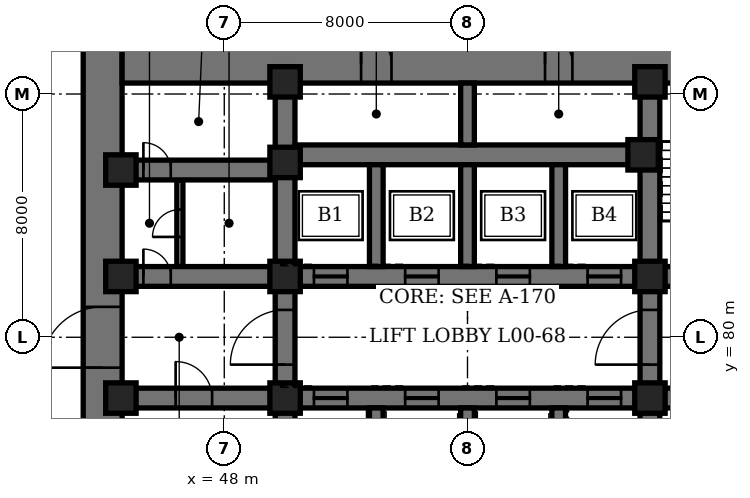
"""IFC4 building model, lengths in metres.
Left out: names, types, materials, properties, quantities, classifications, styles, units other than length and angle.
Written with IfcOpenShell. Run it as: python <this file> out.ifc"""

import sys

from ifc_helpers import new_model, si_unit, direction, frame, frame_2d, origin, origin_2d, place, context, subcontext, project, spatial, rectangle, hollow_rectangle, extrude, element, fill, save


model = new_model("IFC4")
c1 = context("Model", 3, precision=1e-05, world=origin(), true_north=direction((0.0, 1.0)))
c2 = subcontext(c1, "Body", "Model", "MODEL_VIEW")
j1 = project(units=[si_unit("LENGTHUNIT", "METRE"), si_unit("PLANEANGLEUNIT", "RADIAN")], contexts=[c1])
p1 = place(None, origin())
s1 = spatial("IfcSite", under=j1, at=p1, CompositionType="ELEMENT")
p2 = place(p1, origin())
s2 = spatial("IfcBuilding", under=s1, at=p2, CompositionType="ELEMENT")
p3 = place(p2, origin())
s3 = spatial("IfcBuildingStorey", under=s2, at=p3, CompositionType="ELEMENT", Elevation=0.0)
p4 = place(p3, frame((44.0, 70.2, -2.0), z_axis=(0.0, 0.0, 1.0), x_axis=(0.0, 1.0, 0.0)))
e1 = element("IfcWall", 1, at=p4, inside=s3, PredefinedType="SHEAR", context=c2, shape_type="SweptSolid", body=[
    extrude(rectangle(XDim=19.44, YDim=1.28, at=frame_2d((9.72, 0.0))), origin(), (0.0, 0.0, 1.0), 6.9),
])
p5 = place(p4, frame((8.8, 0.0, 2.0)))
e2 = element("IfcOpeningElement", 2, at=p5, cuts=e1, PredefinedType="OPENING", context=c2, shape_type="SweptSolid", body=[
    extrude(rectangle(XDim=2.0, YDim=2.4, at=frame_2d((1.0, 1.2))), frame((0.0, 0.65, 0.0), z_axis=(0.0, -1.0, 0.0), x_axis=(1.0, 0.0, 0.0)), (0.0, 0.0, 1.0), 1.3),
])
p6 = place(p3, frame((44.64, 89.0, -2.0), z_axis=(0.0, 0.0, 1.0), x_axis=(1.0, 0.0, 0.0)))
e3 = element("IfcWall", 3, at=p6, inside=s3, PredefinedType="SHEAR", context=c2, shape_type="SweptSolid", body=[
    extrude(rectangle(XDim=22.61, YDim=1.28, at=frame_2d((11.305, 0.0))), origin(), (0.0, 0.0, 1.0), 6.9),
])
p7 = place(p6, frame((7.86, 0.0, 2.0)))
e4 = element("IfcOpeningElement", 4, at=p7, cuts=e3, PredefinedType="OPENING", context=c2, shape_type="SweptSolid", body=[
    extrude(rectangle(XDim=1.0, YDim=2.1, at=frame_2d((0.5, 1.05))), frame((0.0, 0.65, 0.0), z_axis=(0.0, -1.0, 0.0), x_axis=(1.0, 0.0, 0.0)), (0.0, 0.0, 1.0), 1.3),
])
p8 = place(p6, frame((13.91, 0.0, 2.0)))
e5 = element("IfcOpeningElement", 5, at=p8, cuts=e3, PredefinedType="OPENING", context=c2, shape_type="SweptSolid", body=[
    extrude(rectangle(XDim=0.9, YDim=2.1, at=frame_2d((0.45, 1.05))), frame((0.0, 0.65, 0.0), z_axis=(0.0, -1.0, 0.0), x_axis=(1.0, 0.0, 0.0)), (0.0, 0.0, 1.0), 1.3),
])
p9 = place(p3, frame((50.0, 71.8, -2.0), z_axis=(0.0, 0.0, 1.0), x_axis=(0.0, 1.0, 0.0)))
e6 = element("IfcWall", 6, at=p9, inside=s3, PredefinedType="SHEAR", context=c2, shape_type="SweptSolid", body=[
    extrude(rectangle(XDim=16.56, YDim=0.65, at=frame_2d((8.28, 0.0))), origin(), (0.0, 0.0, 1.0), 6.9),
])
p10 = place(p9, frame((7.3, 0.0, 2.0)))
e7 = element("IfcOpeningElement", 7, at=p10, cuts=e6, PredefinedType="OPENING", context=c2, shape_type="SweptSolid", body=[
    extrude(rectangle(XDim=1.8, YDim=2.4, at=frame_2d((0.9, 1.2))), frame((0.0, 0.335, 0.0), z_axis=(0.0, -1.0, 0.0), x_axis=(1.0, 0.0, 0.0)), (0.0, 0.0, 1.0), 0.67),
])
p11 = place(p3, frame((62.0, 71.8, -2.0), z_axis=(0.0, 0.0, 1.0), x_axis=(0.0, 1.0, 0.0)))
e8 = element("IfcWall", 8, at=p11, inside=s3, PredefinedType="SHEAR", context=c2, shape_type="SweptSolid", body=[
    extrude(rectangle(XDim=16.56, YDim=0.65, at=frame_2d((8.28, 0.0))), origin(), (0.0, 0.0, 1.0), 6.9),
])
p12 = place(p11, frame((7.3, 0.0, 2.0)))
e9 = element("IfcOpeningElement", 9, at=p12, cuts=e8, PredefinedType="OPENING", context=c2, shape_type="SweptSolid", body=[
    extrude(rectangle(XDim=1.8, YDim=2.4, at=frame_2d((0.9, 1.2))), frame((0.0, 0.335, 0.0), z_axis=(0.0, -1.0, 0.0), x_axis=(1.0, 0.0, 0.0)), (0.0, 0.0, 1.0), 0.67),
])
p13 = place(p3, frame((44.64, 78.0, -2.0), z_axis=(0.0, 0.0, 1.0), x_axis=(1.0, 0.0, 0.0)))
e10 = element("IfcWall", 10, at=p13, inside=s3, PredefinedType="SHEAR", context=c2, shape_type="SweptSolid", body=[
    extrude(rectangle(XDim=5.035, YDim=0.65, at=frame_2d((2.518, 0.0))), origin(), (0.0, 0.0, 1.0), 6.9),
])
p14 = place(p13, frame((1.76, 0.0, 2.0)))
e11 = element("IfcOpeningElement", 11, at=p14, cuts=e10, PredefinedType="OPENING", context=c2, shape_type="SweptSolid", body=[
    extrude(rectangle(XDim=1.2, YDim=2.1, at=frame_2d((0.6, 1.05))), frame((0.0, 0.335, 0.0), z_axis=(0.0, -1.0, 0.0), x_axis=(1.0, 0.0, 0.0)), (0.0, 0.0, 1.0), 0.67),
])
p15 = place(p3, frame((44.64, 82.0, -2.0), z_axis=(0.0, 0.0, 1.0), x_axis=(1.0, 0.0, 0.0)))
e12 = element("IfcWall", 12, at=p15, inside=s3, PredefinedType="SHEAR", context=c2, shape_type="SweptSolid", body=[
    extrude(rectangle(XDim=5.035, YDim=0.65, at=frame_2d((2.518, 0.0))), origin(), (0.0, 0.0, 1.0), 6.9),
])
p16 = place(p15, frame((0.7, 0.0, 2.0)))
e13 = element("IfcOpeningElement", 13, at=p16, cuts=e12, PredefinedType="OPENING", context=c2, shape_type="SweptSolid", body=[
    extrude(rectangle(XDim=0.9, YDim=2.1, at=frame_2d((0.45, 1.05))), frame((0.0, 0.335, 0.0), z_axis=(0.0, -1.0, 0.0), x_axis=(1.0, 0.0, 0.0)), (0.0, 0.0, 1.0), 0.67),
])
p17 = place(p3, frame((44.64, 85.5, -2.0), z_axis=(0.0, 0.0, 1.0), x_axis=(1.0, 0.0, 0.0)))
e14 = element("IfcWall", 14, at=p17, inside=s3, PredefinedType="SHEAR", context=c2, shape_type="SweptSolid", body=[
    extrude(rectangle(XDim=5.035, YDim=0.65, at=frame_2d((2.518, 0.0))), origin(), (0.0, 0.0, 1.0), 6.9),
])
p18 = place(p17, frame((0.7, 0.0, 2.0)))
e15 = element("IfcOpeningElement", 15, at=p18, cuts=e14, PredefinedType="OPENING", context=c2, shape_type="SweptSolid", body=[
    extrude(rectangle(XDim=0.9, YDim=2.1, at=frame_2d((0.45, 1.05))), frame((0.0, 0.335, 0.0), z_axis=(0.0, -1.0, 0.0), x_axis=(1.0, 0.0, 0.0)), (0.0, 0.0, 1.0), 0.67),
])
p19 = place(p3, frame((62.325, 78.0, -2.0), z_axis=(0.0, 0.0, 1.0), x_axis=(1.0, 0.0, 0.0)))
e16 = element("IfcWall", 16, at=p19, inside=s3, PredefinedType="SHEAR", context=c2, shape_type="SweptSolid", body=[
    extrude(rectangle(XDim=4.925, YDim=0.65, at=frame_2d((2.462, 0.0))), origin(), (0.0, 0.0, 1.0), 6.9),
])
p20 = place(p19, frame((2.075, 0.0, 2.0)))
e17 = element("IfcOpeningElement", 17, at=p20, cuts=e16, PredefinedType="OPENING", context=c2, shape_type="SweptSolid", body=[
    extrude(rectangle(XDim=1.2, YDim=2.1, at=frame_2d((0.6, 1.05))), frame((0.0, 0.335, 0.0), z_axis=(0.0, -1.0, 0.0), x_axis=(1.0, 0.0, 0.0)), (0.0, 0.0, 1.0), 0.67),
])
p21 = place(p3, frame((62.325, 82.0, -2.0), z_axis=(0.0, 0.0, 1.0), x_axis=(1.0, 0.0, 0.0)))
e18 = element("IfcWall", 18, at=p21, inside=s3, PredefinedType="SHEAR", context=c2, shape_type="SweptSolid", body=[
    extrude(rectangle(XDim=4.925, YDim=0.65, at=frame_2d((2.462, 0.0))), origin(), (0.0, 0.0, 1.0), 6.9),
])
p22 = place(p21, frame((2.075, 0.0, 2.0)))
e19 = element("IfcOpeningElement", 19, at=p22, cuts=e18, PredefinedType="OPENING", context=c2, shape_type="SweptSolid", body=[
    extrude(rectangle(XDim=1.2, YDim=2.1, at=frame_2d((0.6, 1.05))), frame((0.0, 0.335, 0.0), z_axis=(0.0, -1.0, 0.0), x_axis=(1.0, 0.0, 0.0)), (0.0, 0.0, 1.0), 0.67),
])
p23 = place(p3, frame((50.325, 78.0, -2.0), z_axis=(0.0, 0.0, 1.0), x_axis=(1.0, 0.0, 0.0)))
e20 = element("IfcWall", 20, at=p23, inside=s3, PredefinedType="SHEAR", context=c2, shape_type="SweptSolid", body=[
    extrude(rectangle(XDim=11.35, YDim=0.65, at=frame_2d((5.675, 0.0))), origin(), (0.0, 0.0, 1.0), 6.9),
])
p24 = place(p23, frame((0.625, 0.0, 2.0)))
e21 = element("IfcOpeningElement", 21, at=p24, cuts=e20, PredefinedType="OPENING", context=c2, shape_type="SweptSolid", body=[
    extrude(rectangle(XDim=1.1, YDim=2.2, at=frame_2d((0.55, 1.1))), frame((0.0, 0.335, 0.0), z_axis=(0.0, -1.0, 0.0), x_axis=(1.0, 0.0, 0.0)), (0.0, 0.0, 1.0), 0.67),
])
p25 = place(p23, frame((3.625, 0.0, 2.0)))
e22 = element("IfcOpeningElement", 22, at=p25, cuts=e20, PredefinedType="OPENING", context=c2, shape_type="SweptSolid", body=[
    extrude(rectangle(XDim=1.1, YDim=2.2, at=frame_2d((0.55, 1.1))), frame((0.0, 0.335, 0.0), z_axis=(0.0, -1.0, 0.0), x_axis=(1.0, 0.0, 0.0)), (0.0, 0.0, 1.0), 0.67),
])
p26 = place(p23, frame((6.625, 0.0, 2.0)))
e23 = element("IfcOpeningElement", 23, at=p26, cuts=e20, PredefinedType="OPENING", context=c2, shape_type="SweptSolid", body=[
    extrude(rectangle(XDim=1.1, YDim=2.2, at=frame_2d((0.55, 1.1))), frame((0.0, 0.335, 0.0), z_axis=(0.0, -1.0, 0.0), x_axis=(1.0, 0.0, 0.0)), (0.0, 0.0, 1.0), 0.67),
])
p27 = place(p23, frame((9.625, 0.0, 2.0)))
e24 = element("IfcOpeningElement", 24, at=p27, cuts=e20, PredefinedType="OPENING", context=c2, shape_type="SweptSolid", body=[
    extrude(rectangle(XDim=1.1, YDim=2.2, at=frame_2d((0.55, 1.1))), frame((0.0, 0.335, 0.0), z_axis=(0.0, -1.0, 0.0), x_axis=(1.0, 0.0, 0.0)), (0.0, 0.0, 1.0), 0.67),
])
p28 = place(p3, frame((50.325, 82.0, -2.0), z_axis=(0.0, 0.0, 1.0), x_axis=(1.0, 0.0, 0.0)))
e25 = element("IfcWall", 25, at=p28, inside=s3, PredefinedType="SHEAR", context=c2, shape_type="SweptSolid", body=[
    extrude(rectangle(XDim=11.35, YDim=0.65, at=frame_2d((5.675, 0.0))), origin(), (0.0, 0.0, 1.0), 6.9),
])
p29 = place(p28, frame((0.625, 0.0, 2.0)))
e26 = element("IfcOpeningElement", 26, at=p29, cuts=e25, PredefinedType="OPENING", context=c2, shape_type="SweptSolid", body=[
    extrude(rectangle(XDim=1.1, YDim=2.2, at=frame_2d((0.55, 1.1))), frame((0.0, 0.335, 0.0), z_axis=(0.0, -1.0, 0.0), x_axis=(1.0, 0.0, 0.0)), (0.0, 0.0, 1.0), 0.67),
])
p30 = place(p28, frame((3.625, 0.0, 2.0)))
e27 = element("IfcOpeningElement", 27, at=p30, cuts=e25, PredefinedType="OPENING", context=c2, shape_type="SweptSolid", body=[
    extrude(rectangle(XDim=1.1, YDim=2.2, at=frame_2d((0.55, 1.1))), frame((0.0, 0.335, 0.0), z_axis=(0.0, -1.0, 0.0), x_axis=(1.0, 0.0, 0.0)), (0.0, 0.0, 1.0), 0.67),
])
p31 = place(p28, frame((6.625, 0.0, 2.0)))
e28 = element("IfcOpeningElement", 28, at=p31, cuts=e25, PredefinedType="OPENING", context=c2, shape_type="SweptSolid", body=[
    extrude(rectangle(XDim=1.1, YDim=2.2, at=frame_2d((0.55, 1.1))), frame((0.0, 0.335, 0.0), z_axis=(0.0, -1.0, 0.0), x_axis=(1.0, 0.0, 0.0)), (0.0, 0.0, 1.0), 0.67),
])
p32 = place(p28, frame((9.625, 0.0, 2.0)))
e29 = element("IfcOpeningElement", 29, at=p32, cuts=e25, PredefinedType="OPENING", context=c2, shape_type="SweptSolid", body=[
    extrude(rectangle(XDim=1.1, YDim=2.2, at=frame_2d((0.55, 1.1))), frame((0.0, 0.335, 0.0), z_axis=(0.0, -1.0, 0.0), x_axis=(1.0, 0.0, 0.0)), (0.0, 0.0, 1.0), 0.67),
])
p33 = place(p3, frame((50.325, 86.0, -2.0), z_axis=(0.0, 0.0, 1.0), x_axis=(1.0, 0.0, 0.0)))
e30 = element("IfcWall", 30, at=p33, inside=s3, PredefinedType="SHEAR", context=c2, shape_type="SweptSolid", body=[
    extrude(rectangle(XDim=11.35, YDim=0.65, at=frame_2d((5.675, 0.0))), origin(), (0.0, 0.0, 1.0), 6.9),
])
p34 = place(p3, frame((53.0, 74.225, -2.0), z_axis=(0.0, 0.0, 1.0), x_axis=(0.0, 1.0, 0.0)))
e31 = element("IfcWall", 31, at=p34, inside=s3, PredefinedType="SHEAR", context=c2, shape_type="SweptSolid", body=[
    extrude(rectangle(XDim=3.45, YDim=0.45, at=frame_2d((1.725, 0.0))), origin(), (0.0, 0.0, 1.0), 6.9),
])
p35 = place(p3, frame((53.0, 82.325, -2.0), z_axis=(0.0, 0.0, 1.0), x_axis=(0.0, 1.0, 0.0)))
e32 = element("IfcWall", 32, at=p35, inside=s3, PredefinedType="SHEAR", context=c2, shape_type="SweptSolid", body=[
    extrude(rectangle(XDim=3.35, YDim=0.45, at=frame_2d((1.675, 0.0))), origin(), (0.0, 0.0, 1.0), 6.9),
])
p36 = place(p3, frame((56.0, 74.225, -2.0), z_axis=(0.0, 0.0, 1.0), x_axis=(0.0, 1.0, 0.0)))
e33 = element("IfcWall", 33, at=p36, inside=s3, PredefinedType="SHEAR", context=c2, shape_type="SweptSolid", body=[
    extrude(rectangle(XDim=3.45, YDim=0.45, at=frame_2d((1.725, 0.0))), origin(), (0.0, 0.0, 1.0), 6.9),
])
p37 = place(p3, frame((56.0, 82.325, -2.0), z_axis=(0.0, 0.0, 1.0), x_axis=(0.0, 1.0, 0.0)))
e34 = element("IfcWall", 34, at=p37, inside=s3, PredefinedType="SHEAR", context=c2, shape_type="SweptSolid", body=[
    extrude(rectangle(XDim=3.35, YDim=0.45, at=frame_2d((1.675, 0.0))), origin(), (0.0, 0.0, 1.0), 6.9),
])
p38 = place(p3, frame((59.0, 74.225, -2.0), z_axis=(0.0, 0.0, 1.0), x_axis=(0.0, 1.0, 0.0)))
e35 = element("IfcWall", 35, at=p38, inside=s3, PredefinedType="SHEAR", context=c2, shape_type="SweptSolid", body=[
    extrude(rectangle(XDim=3.45, YDim=0.45, at=frame_2d((1.725, 0.0))), origin(), (0.0, 0.0, 1.0), 6.9),
])
p39 = place(p3, frame((59.0, 82.325, -2.0), z_axis=(0.0, 0.0, 1.0), x_axis=(0.0, 1.0, 0.0)))
e36 = element("IfcWall", 36, at=p39, inside=s3, PredefinedType="SHEAR", context=c2, shape_type="SweptSolid", body=[
    extrude(rectangle(XDim=3.35, YDim=0.45, at=frame_2d((1.675, 0.0))), origin(), (0.0, 0.0, 1.0), 6.9),
])
p40 = place(p3, frame((56.0, 86.325, -2.0), z_axis=(0.0, 0.0, 1.0), x_axis=(0.0, 1.0, 0.0)))
e37 = element("IfcWall", 37, at=p40, inside=s3, PredefinedType="SHEAR", context=c2, shape_type="SweptSolid", body=[
    extrude(rectangle(XDim=2.035, YDim=0.45, at=frame_2d((1.018, 0.0))), origin(), (0.0, 0.0, 1.0), 6.9),
])
for number, where, z_axis, x_axis in (
    (38, (44.6, 78.0, -2.0), (0.0, 0.0, 1.0), (1.0, 0.0, 0.0)),
    (39, (44.6, 82.0, -2.0), (0.0, 0.0, 1.0), (1.0, 0.0, 0.0)),
    (40, (44.6, 85.5, -2.0), (0.0, 0.0, 1.0), (1.0, 0.0, 0.0)),
    (41, (50.0, 78.0, -2.0), (0.0, 0.0, 1.0), (1.0, 0.0, 0.0)),
    (42, (50.0, 82.0, -2.0), (0.0, 0.0, 1.0), (1.0, 0.0, 0.0)),
    (43, (50.0, 85.75, -2.0), (0.0, 0.0, 1.0), (1.0, 0.0, 0.0)),
    (44, (50.0, 88.4, -2.0), (0.0, 0.0, 1.0), (1.0, 0.0, 0.0)),
    (45, (61.775, 86.0, -2.0), (0.0, 0.0, 1.0), (1.0, 0.0, 0.0)),
    (46, (62.0, 78.0, -2.0), (0.0, 0.0, 1.0), (1.0, 0.0, 0.0)),
    (47, (62.0, 82.0, -2.0), (0.0, 0.0, 1.0), (1.0, 0.0, 0.0)),
    (48, (62.0, 88.4, -2.0), (0.0, 0.0, 1.0), (1.0, 0.0, 0.0)),
):
    element("IfcColumn", number, at=place(p3, frame(where, z_axis=z_axis, x_axis=x_axis)), inside=s3, PredefinedType="COLUMN", context=c2, shape_type="SweptSolid", body=[
        extrude(hollow_rectangle(XDim=1.0, YDim=1.0, WallThickness=0.15, at=origin_2d()), origin(), (0.0, 0.0, 1.0), 6.9),
    ])
p41 = place(p3, frame((46.54, 82.325, 0.0), z_axis=(0.0, 0.0, 1.0), x_axis=(0.0, 1.0, 0.0)))
e49 = element("IfcWall", 49, at=p41, inside=s3, PredefinedType="PARTITIONING", context=c2, shape_type="SweptSolid", body=[
    extrude(rectangle(XDim=2.85, YDim=0.2, at=frame_2d((1.425, 0.0))), origin(), (0.0, 0.0, 1.0), 4.7),
])
p42 = place(p41, frame((0.975, 0.0, 0.0)))
e50 = element("IfcOpeningElement", 50, at=p42, cuts=e49, PredefinedType="OPENING", context=c2, shape_type="SweptSolid", body=[
    extrude(rectangle(XDim=0.9, YDim=2.1, at=frame_2d((0.45, 1.05))), frame((0.0, 0.11, 0.0), z_axis=(0.0, -1.0, 0.0), x_axis=(1.0, 0.0, 0.0)), (0.0, 0.0, 1.0), 0.22),
])
p43 = place(p16, origin())
e51 = element("IfcDoor", 51, at=p43, inside=s3, OperationType="SINGLE_SWING_LEFT", PredefinedType="DOOR", context=c2, shape_type="SweptSolid", body=[
    extrude(rectangle(XDim=0.9, YDim=2.1, at=frame_2d((0.45, 1.05))), frame((0.0, 0.325, 0.0), z_axis=(0.0, -1.0, 0.0), x_axis=(1.0, 0.0, 0.0)), (0.0, 0.0, 1.0), 0.649),
])
fill(e13, e51)
p44 = place(p42, origin())
e52 = element("IfcDoor", 52, at=p44, inside=s3, OperationType="SINGLE_SWING_RIGHT", PredefinedType="DOOR", context=c2, shape_type="SweptSolid", body=[
    extrude(rectangle(XDim=0.9, YDim=2.1, at=frame_2d((0.45, 1.05))), frame((0.0, 0.1, 0.0), z_axis=(0.0, -1.0, 0.0), x_axis=(1.0, 0.0, 0.0)), (0.0, 0.0, 1.0), 0.199),
])
fill(e50, e52)
p45 = place(p18, origin())
e53 = element("IfcDoor", 53, at=p45, inside=s3, OperationType="SINGLE_SWING_RIGHT", PredefinedType="DOOR", context=c2, shape_type="SweptSolid", body=[
    extrude(rectangle(XDim=0.9, YDim=2.1, at=frame_2d((0.45, 1.05))), frame((0.0, 0.325, 0.0), z_axis=(0.0, -1.0, 0.0), x_axis=(1.0, 0.0, 0.0)), (0.0, 0.0, 1.0), 0.649),
])
fill(e15, e53)
p46 = place(p7, origin())
e54 = element("IfcDoor", 54, at=p46, inside=s3, OperationType="SINGLE_SWING_LEFT", PredefinedType="DOOR", context=c2, shape_type="SweptSolid", body=[
    extrude(rectangle(XDim=1.0, YDim=2.1, at=frame_2d((0.5, 1.05))), frame((0.0, 0.35, 0.0), z_axis=(0.0, -1.0, 0.0), x_axis=(1.0, 0.0, 0.0)), (0.0, 0.0, 1.0), 0.7),
])
fill(e4, e54)
p47 = place(p8, origin())
e55 = element("IfcDoor", 55, at=p47, inside=s3, OperationType="SINGLE_SWING_LEFT", PredefinedType="DOOR", context=c2, shape_type="SweptSolid", body=[
    extrude(rectangle(XDim=0.9, YDim=2.1, at=frame_2d((0.45, 1.05))), frame((0.0, 0.35, 0.0), z_axis=(0.0, -1.0, 0.0), x_axis=(1.0, 0.0, 0.0)), (0.0, 0.0, 1.0), 0.7),
])
fill(e5, e55)
p48 = place(p14, origin())
e56 = element("IfcDoor", 56, at=p48, inside=s3, OperationType="SINGLE_SWING_LEFT", PredefinedType="DOOR", context=c2, shape_type="SweptSolid", body=[
    extrude(rectangle(XDim=1.2, YDim=2.1, at=frame_2d((0.6, 1.05))), frame((0.0, 0.325, 0.0), z_axis=(0.0, -1.0, 0.0), x_axis=(1.0, 0.0, 0.0)), (0.0, 0.0, 1.0), 0.649),
])
fill(e11, e56)
p49 = place(p5, origin())
e57 = element("IfcDoor", 57, at=p49, inside=s3, OperationType="DOUBLE_DOOR_SINGLE_SWING", PredefinedType="DOOR", context=c2, shape_type="SweptSolid", body=[
    extrude(rectangle(XDim=2.0, YDim=2.4, at=frame_2d((1.0, 1.2))), frame((0.0, 0.64, 0.0), z_axis=(0.0, -1.0, 0.0), x_axis=(1.0, 0.0, 0.0)), (0.0, 0.0, 1.0), 0.7),
])
fill(e2, e57)
p50 = place(p10, origin())
e58 = element("IfcDoor", 58, at=p50, inside=s3, OperationType="DOUBLE_DOOR_SINGLE_SWING", PredefinedType="DOOR", context=c2, shape_type="SweptSolid", body=[
    extrude(rectangle(XDim=1.8, YDim=2.4, at=frame_2d((0.9, 1.2))), frame((0.0, 0.325, 0.0), z_axis=(0.0, -1.0, 0.0), x_axis=(1.0, 0.0, 0.0)), (0.0, 0.0, 1.0), 0.649),
])
fill(e7, e58)
p51 = place(p12, origin())
e59 = element("IfcDoor", 59, at=p51, inside=s3, OperationType="DOUBLE_DOOR_SINGLE_SWING", PredefinedType="DOOR", context=c2, shape_type="SweptSolid", body=[
    extrude(rectangle(XDim=1.8, YDim=2.4, at=frame_2d((0.9, 1.2))), frame((0.0, 0.325, 0.0), z_axis=(0.0, -1.0, 0.0), x_axis=(1.0, 0.0, 0.0)), (0.0, 0.0, 1.0), 0.649),
])
fill(e9, e59)
p52 = place(p24, origin())
e60 = element("IfcDoor", 60, at=p52, inside=s3, OperationType="SLIDING_TO_LEFT", PredefinedType="DOOR", context=c2, shape_type="SweptSolid", body=[
    extrude(rectangle(XDim=1.1, YDim=2.2, at=frame_2d((0.55, 1.1))), frame((0.0, 0.325, 0.0), z_axis=(0.0, -1.0, 0.0), x_axis=(1.0, 0.0, 0.0)), (0.0, 0.0, 1.0), 0.649),
])
fill(e21, e60)
p53 = place(p25, origin())
e61 = element("IfcDoor", 61, at=p53, inside=s3, OperationType="SLIDING_TO_LEFT", PredefinedType="DOOR", context=c2, shape_type="SweptSolid", body=[
    extrude(rectangle(XDim=1.1, YDim=2.2, at=frame_2d((0.55, 1.1))), frame((0.0, 0.325, 0.0), z_axis=(0.0, -1.0, 0.0), x_axis=(1.0, 0.0, 0.0)), (0.0, 0.0, 1.0), 0.649),
])
fill(e22, e61)
p54 = place(p26, origin())
e62 = element("IfcDoor", 62, at=p54, inside=s3, OperationType="SLIDING_TO_LEFT", PredefinedType="DOOR", context=c2, shape_type="SweptSolid", body=[
    extrude(rectangle(XDim=1.1, YDim=2.2, at=frame_2d((0.55, 1.1))), frame((0.0, 0.325, 0.0), z_axis=(0.0, -1.0, 0.0), x_axis=(1.0, 0.0, 0.0)), (0.0, 0.0, 1.0), 0.649),
])
fill(e23, e62)
p55 = place(p27, origin())
e63 = element("IfcDoor", 63, at=p55, inside=s3, OperationType="SLIDING_TO_LEFT", PredefinedType="DOOR", context=c2, shape_type="SweptSolid", body=[
    extrude(rectangle(XDim=1.1, YDim=2.2, at=frame_2d((0.55, 1.1))), frame((0.0, 0.325, 0.0), z_axis=(0.0, -1.0, 0.0), x_axis=(1.0, 0.0, 0.0)), (0.0, 0.0, 1.0), 0.649),
])
fill(e24, e63)
p56 = place(p29, origin())
e64 = element("IfcDoor", 64, at=p56, inside=s3, OperationType="SLIDING_TO_LEFT", PredefinedType="DOOR", context=c2, shape_type="SweptSolid", body=[
    extrude(rectangle(XDim=1.1, YDim=2.2, at=frame_2d((0.55, 1.1))), frame((0.0, 0.325, 0.0), z_axis=(0.0, -1.0, 0.0), x_axis=(1.0, 0.0, 0.0)), (0.0, 0.0, 1.0), 0.649),
])
fill(e26, e64)
p57 = place(p30, origin())
e65 = element("IfcDoor", 65, at=p57, inside=s3, OperationType="SLIDING_TO_LEFT", PredefinedType="DOOR", context=c2, shape_type="SweptSolid", body=[
    extrude(rectangle(XDim=1.1, YDim=2.2, at=frame_2d((0.55, 1.1))), frame((0.0, 0.325, 0.0), z_axis=(0.0, -1.0, 0.0), x_axis=(1.0, 0.0, 0.0)), (0.0, 0.0, 1.0), 0.649),
])
fill(e27, e65)
p58 = place(p31, origin())
e66 = element("IfcDoor", 66, at=p58, inside=s3, OperationType="SLIDING_TO_LEFT", PredefinedType="DOOR", context=c2, shape_type="SweptSolid", body=[
    extrude(rectangle(XDim=1.1, YDim=2.2, at=frame_2d((0.55, 1.1))), frame((0.0, 0.325, 0.0), z_axis=(0.0, -1.0, 0.0), x_axis=(1.0, 0.0, 0.0)), (0.0, 0.0, 1.0), 0.649),
])
fill(e28, e66)
p59 = place(p32, origin())
e67 = element("IfcDoor", 67, at=p59, inside=s3, OperationType="SLIDING_TO_LEFT", PredefinedType="DOOR", context=c2, shape_type="SweptSolid", body=[
    extrude(rectangle(XDim=1.1, YDim=2.2, at=frame_2d((0.55, 1.1))), frame((0.0, 0.325, 0.0), z_axis=(0.0, -1.0, 0.0), x_axis=(1.0, 0.0, 0.0)), (0.0, 0.0, 1.0), 0.649),
])
fill(e29, e67)
save(model, sys.argv[1])
